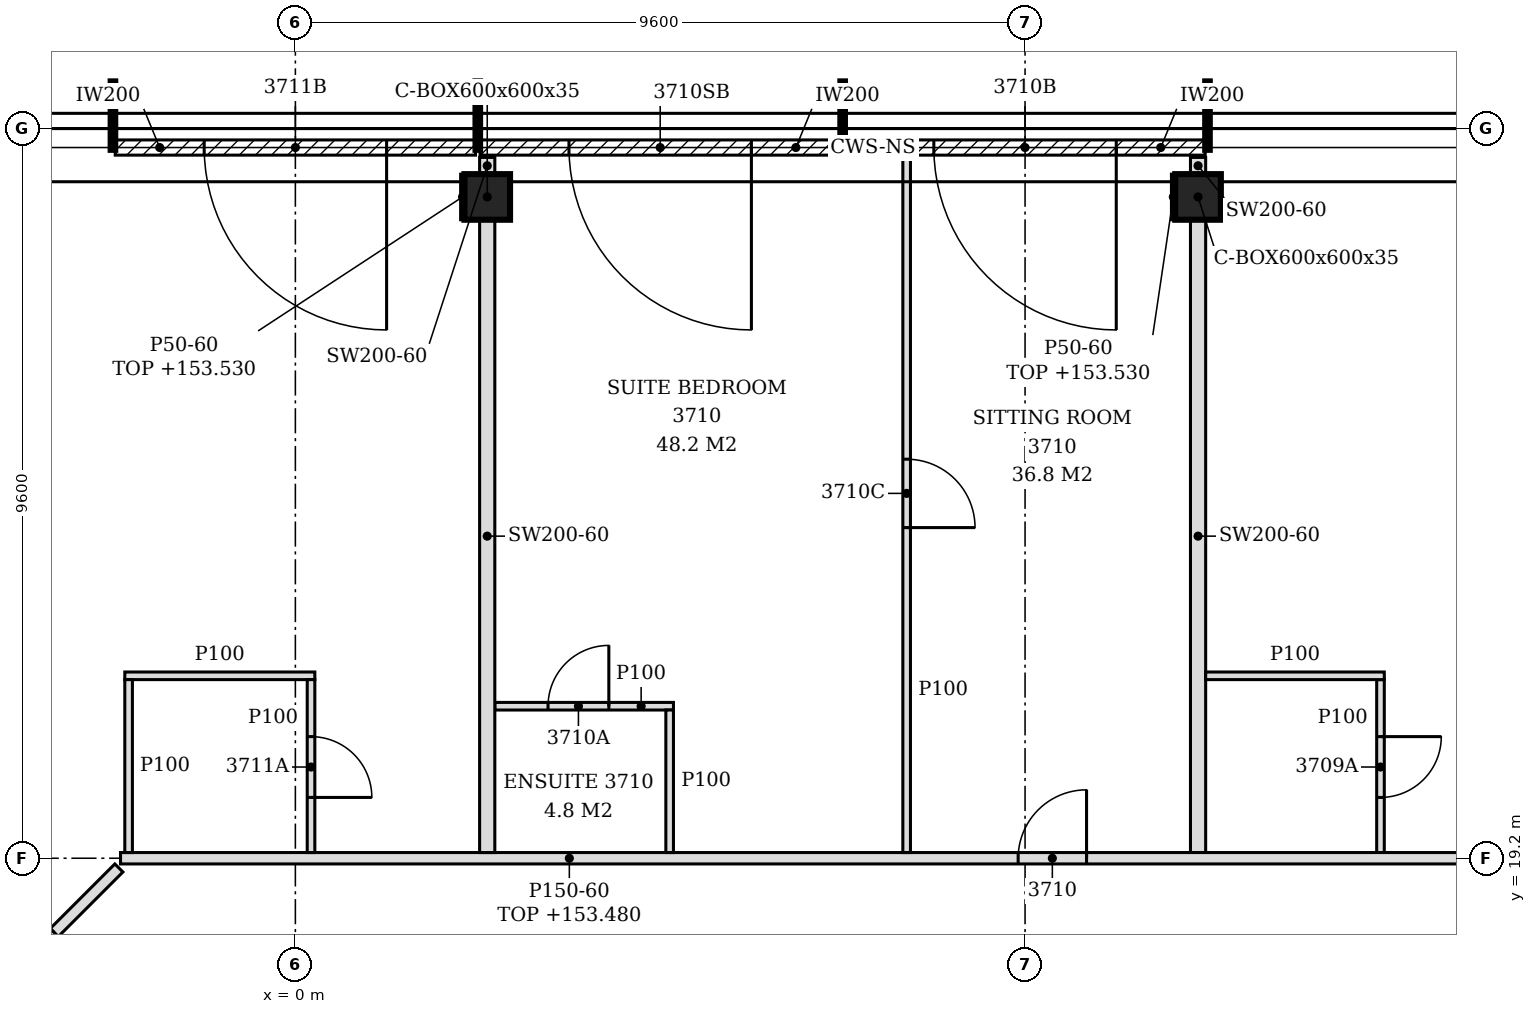
"""IFC4 building model, lengths in metres.
Left out: names, types, materials, properties, quantities, classifications, styles, units other than length and angle.
Written with IfcOpenShell. Run it as: python <this file> out.ifc"""

import sys

from ifc_helpers import new_model, si_unit, direction, frame, frame_2d, origin, origin_2d, place, context, subcontext, project, spatial, polyline, rectangle, hollow_rectangle, outline, extrude, element, fill, save


model = new_model("IFC4")
c1 = context("Model", 3, precision=1e-05, world=origin(), true_north=direction((0.0, 1.0)))
c2 = subcontext(c1, "Body", "Model", "MODEL_VIEW")
j1 = project(units=[si_unit("LENGTHUNIT", "METRE"), si_unit("PLANEANGLEUNIT", "RADIAN")], contexts=[c1])
p1 = place(None, origin())
s1 = spatial("IfcSite", under=j1, at=p1, CompositionType="ELEMENT")
p2 = place(p1, origin())
s2 = spatial("IfcBuilding", under=s1, at=p2, CompositionType="ELEMENT")
p3 = place(p2, frame((0.0, 0.0, 150.6)))
s3 = spatial("IfcBuildingStorey", under=s2, at=p3, CompositionType="ELEMENT", Elevation=150.6)
for number, where, z_axis, x_axis in (
    (1, (11.876, 27.9, -0.15), (0.0, 0.0, 1.0), (1.0, 0.0, 0.0)),
    (2, (2.524, 27.9, -0.15), (0.0, 0.0, 1.0), (1.0, 0.0, 0.0)),
):
    element("IfcColumn", number, at=place(p3, frame(where, z_axis=z_axis, x_axis=x_axis)), inside=s3, PredefinedType="COLUMN", context=c2, shape_type="SweptSolid", body=[
        extrude(hollow_rectangle(XDim=0.6, YDim=0.6, WallThickness=0.035, at=origin_2d()), origin(), (0.0, 0.0, 1.0), 3.6),
    ])
p4 = place(p3, frame((11.97, 28.55, 0.0), z_axis=(0.0, 0.0, 1.0), x_axis=(-1.0, 0.0, 0.0)))
e3 = element("IfcWall", 3, at=p4, inside=s3, PredefinedType="NOTDEFINED", context=c2, shape_type="SweptSolid", body=[
    extrude(rectangle(XDim=4.74, YDim=0.2, at=frame_2d((2.37, 0.0))), origin(), (0.0, 0.0, 1.0), 3.45),
])
p5 = place(p4, frame((1.17, 0.0, 0.0)))
e4 = element("IfcOpeningElement", 4, at=p5, cuts=e3, PredefinedType="OPENING", context=c2, shape_type="SweptSolid", body=[
    extrude(rectangle(XDim=2.4, YDim=2.4, at=frame_2d((1.2, 1.2))), frame((0.0, 0.11, 0.0), z_axis=(0.0, -1.0, 0.0), x_axis=(1.0, 0.0, 0.0)), (0.0, 0.0, 1.0), 0.22),
])
p6 = place(p3, frame((7.17, 28.55, 0.0), z_axis=(0.0, 0.0, 1.0), x_axis=(-1.0, 0.0, 0.0)))
e5 = element("IfcWall", 5, at=p6, inside=s3, PredefinedType="NOTDEFINED", context=c2, shape_type="SweptSolid", body=[
    extrude(rectangle(XDim=4.74, YDim=0.2, at=frame_2d((2.37, 0.0))), origin(), (0.0, 0.0, 1.0), 3.45),
])
p7 = place(p6, frame((1.17, 0.0, 0.0)))
e6 = element("IfcOpeningElement", 6, at=p7, cuts=e5, PredefinedType="OPENING", context=c2, shape_type="SweptSolid", body=[
    extrude(rectangle(XDim=2.4, YDim=2.4, at=frame_2d((1.2, 1.2))), frame((0.0, 0.11, 0.0), z_axis=(0.0, -1.0, 0.0), x_axis=(1.0, 0.0, 0.0)), (0.0, 0.0, 1.0), 0.22),
])
p8 = place(p3, frame((2.37, 28.55, 0.0), z_axis=(0.0, 0.0, 1.0), x_axis=(-1.0, 0.0, 0.0)))
e7 = element("IfcWall", 7, at=p8, inside=s3, PredefinedType="NOTDEFINED", context=c2, shape_type="SweptSolid", body=[
    extrude(rectangle(XDim=4.74, YDim=0.2, at=frame_2d((2.37, 0.0))), origin(), (0.0, 0.0, 1.0), 3.45),
])
p9 = place(p8, frame((1.17, 0.0, 0.0)))
e8 = element("IfcOpeningElement", 8, at=p9, cuts=e7, PredefinedType="OPENING", context=c2, shape_type="SweptSolid", body=[
    extrude(rectangle(XDim=2.4, YDim=2.4, at=frame_2d((1.2, 1.2))), frame((0.0, 0.11, 0.0), z_axis=(0.0, -1.0, 0.0), x_axis=(1.0, 0.0, 0.0)), (0.0, 0.0, 1.0), 0.22),
])
p10 = place(p3, frame((-12.075, 9.319, 0.0), z_axis=(0.0, 0.0, 1.0), x_axis=(0.707106781187, 0.707106781187, 0.0)))
e9 = element("IfcWall", 9, at=p10, inside=s3, PredefinedType="PARTITIONING", context=c2, shape_type="SweptSolid", body=[
    extrude(rectangle(XDim=13.793, YDim=0.15, at=frame_2d((6.896, 0.0))), origin(), (0.0, 0.0, 1.0), 2.73),
])
p11 = place(p10, frame((11.692, 0.0, 0.0)))
e10 = element("IfcOpeningElement", 10, at=p11, cuts=e9, PredefinedType="OPENING", context=c2, shape_type="SweptSolid", body=[
    extrude(rectangle(XDim=0.9, YDim=2.1, at=frame_2d((0.45, 1.05))), frame((0.0, 0.085, 0.0), z_axis=(0.0, -1.0, 0.0), x_axis=(1.0, 0.0, 0.0)), (0.0, 0.0, 1.0), 0.17),
])
p12 = place(p10, frame((7.376, 0.0, 0.0)))
e11 = element("IfcOpeningElement", 11, at=p12, cuts=e9, PredefinedType="OPENING", context=c2, shape_type="SweptSolid", body=[
    extrude(rectangle(XDim=0.9, YDim=2.1, at=frame_2d((0.45, 1.05))), frame((0.0, 0.085, 0.0), z_axis=(0.0, -1.0, 0.0), x_axis=(1.0, 0.0, 0.0)), (0.0, 0.0, 1.0), 0.17),
])
p13 = place(p10, frame((3.62, 0.0, 0.0)))
e12 = element("IfcOpeningElement", 12, at=p13, cuts=e9, PredefinedType="OPENING", context=c2, shape_type="SweptSolid", body=[
    extrude(rectangle(XDim=0.9, YDim=2.1, at=frame_2d((0.45, 1.05))), frame((0.0, 0.085, 0.0), z_axis=(0.0, -1.0, 0.0), x_axis=(1.0, 0.0, 0.0)), (0.0, 0.0, 1.0), 0.17),
])
p14 = place(p3, frame((-2.3, 19.2, 0.0), z_axis=(0.0, 0.0, 1.0), x_axis=(1.0, 0.0, 0.0)))
e13 = element("IfcWall", 13, at=p14, inside=s3, PredefinedType="PARTITIONING", context=c2, shape_type="SweptSolid", body=[
    extrude(outline(polyline([(0.0, 0.0), (19.0, 0.0), (19.0, 2.88), (9.65, 2.88), (9.648, 2.73), (9.35, 2.73), (9.348, 2.88), (0.0, 2.88), (0.0, 0.0)])), frame((0.0, 0.075, 0.0), z_axis=(0.0, -1.0, 0.0), x_axis=(1.0, 0.0, 0.0)), (0.0, 0.0, 1.0), 0.15),
])
p15 = place(p14, frame((11.809, 0.0, 0.0)))
e14 = element("IfcOpeningElement", 14, at=p15, cuts=e13, PredefinedType="OPENING", context=c2, shape_type="SweptSolid", body=[
    extrude(rectangle(XDim=0.9, YDim=2.1, at=frame_2d((0.45, 1.05))), frame((0.0, 0.085, 0.0), z_axis=(0.0, -1.0, 0.0), x_axis=(1.0, 0.0, 0.0)), (0.0, 0.0, 1.0), 0.17),
])
p16 = place(p3, frame((-2.194, 19.275, 0.0), z_axis=(0.0, 0.0, 1.0), x_axis=(0.0, 1.0, 0.0)))
e15 = element("IfcWall", 15, at=p16, inside=s3, PredefinedType="PARTITIONING", context=c2, shape_type="SweptSolid", body=[
    extrude(outline(polyline([(0.0, 0.0), (2.275, 0.0), (2.275, 3.45), (0.03, 3.45), (0.028, 2.88), (0.0, 2.88), (0.0, 0.0)])), frame((0.0, 0.05, 0.0), z_axis=(0.0, -1.0, 0.0), x_axis=(1.0, 0.0, 0.0)), (0.0, 0.0, 1.0), 0.1),
])
p17 = place(p3, frame((0.206, 19.275, 0.0), z_axis=(0.0, 0.0, 1.0), x_axis=(0.0, 1.0, 0.0)))
e16 = element("IfcWall", 16, at=p17, inside=s3, PredefinedType="PARTITIONING", context=c2, shape_type="SweptSolid", body=[
    extrude(outline(polyline([(0.0, 0.0), (2.275, 0.0), (2.275, 3.45), (0.03, 3.45), (0.028, 2.88), (0.0, 2.88), (0.0, 0.0)])), frame((0.0, 0.05, 0.0), z_axis=(0.0, -1.0, 0.0), x_axis=(1.0, 0.0, 0.0)), (0.0, 0.0, 1.0), 0.1),
])
p18 = place(p17, frame((0.725, 0.0, 0.0)))
e17 = element("IfcOpeningElement", 17, at=p18, cuts=e16, PredefinedType="OPENING", context=c2, shape_type="SweptSolid", body=[
    extrude(rectangle(XDim=0.8, YDim=2.1, at=frame_2d((0.4, 1.05))), frame((0.0, 0.06, 0.0), z_axis=(0.0, -1.0, 0.0), x_axis=(1.0, 0.0, 0.0)), (0.0, 0.0, 1.0), 0.12),
])
p19 = place(p3, frame((2.524, 19.275, 0.0), z_axis=(0.0, 0.0, 1.0), x_axis=(0.0, 1.0, 0.0)))
e18 = element("IfcWall", 18, at=p19, inside=s3, PredefinedType="PARTITIONING", context=c2, shape_type="SweptSolid", body=[
    extrude(outline(polyline([(0.0, 0.0), (8.325, 0.0), (8.325, 3.45), (4.83, 3.45), (4.828, 2.88), (4.62, 2.88), (4.618, 3.45), (0.03, 3.45), (0.028, 2.88), (0.0, 2.88), (0.0, 0.0)])), frame((0.0, 0.1, 0.0), z_axis=(0.0, -1.0, 0.0), x_axis=(1.0, 0.0, 0.0)), (0.0, 0.0, 1.0), 0.2),
])
p20 = place(p3, frame((4.924, 19.275, 0.0), z_axis=(0.0, 0.0, 1.0), x_axis=(0.0, 1.0, 0.0)))
e19 = element("IfcWall", 19, at=p20, inside=s3, PredefinedType="PARTITIONING", context=c2, shape_type="SweptSolid", body=[
    extrude(outline(polyline([(0.0, 0.0), (1.875, 0.0), (1.875, 3.45), (0.03, 3.45), (0.028, 2.88), (0.0, 2.88), (0.0, 0.0)])), frame((0.0, 0.05, 0.0), z_axis=(0.0, -1.0, 0.0), x_axis=(1.0, 0.0, 0.0)), (0.0, 0.0, 1.0), 0.1),
])
p21 = place(p3, frame((8.042, 19.275, 0.0), z_axis=(0.0, 0.0, 1.0), x_axis=(0.0, 1.0, 0.0)))
e20 = element("IfcWall", 20, at=p21, inside=s3, PredefinedType="PARTITIONING", context=c2, shape_type="SweptSolid", body=[
    extrude(outline(polyline([(0.0, 0.0), (9.145, 0.0), (9.145, 3.45), (8.775, 3.45), (8.773, 2.93), (8.475, 2.93), (8.473, 3.45), (4.83, 3.45), (4.828, 2.88), (4.62, 2.88), (4.618, 3.45), (0.03, 3.45), (0.028, 2.88), (0.0, 2.88), (0.0, 0.0)])), frame((0.0, 0.05, 0.0), z_axis=(0.0, -1.0, 0.0), x_axis=(1.0, 0.0, 0.0)), (0.0, 0.0, 1.0), 0.1),
])
p22 = place(p21, frame((4.275, 0.0, 0.0)))
e21 = element("IfcOpeningElement", 21, at=p22, cuts=e20, PredefinedType="OPENING", context=c2, shape_type="SweptSolid", body=[
    extrude(rectangle(XDim=0.9, YDim=2.1, at=frame_2d((0.45, 1.05))), frame((0.0, 0.06, 0.0), z_axis=(0.0, -1.0, 0.0), x_axis=(1.0, 0.0, 0.0)), (0.0, 0.0, 1.0), 0.12),
])
p23 = place(p3, frame((11.876, 19.275, 0.0), z_axis=(0.0, 0.0, 1.0), x_axis=(0.0, 1.0, 0.0)))
e22 = element("IfcWall", 22, at=p23, inside=s3, PredefinedType="PARTITIONING", context=c2, shape_type="SweptSolid", body=[
    extrude(outline(polyline([(0.0, 0.0), (8.325, 0.0), (8.325, 3.45), (4.83, 3.45), (4.828, 2.88), (4.62, 2.88), (4.618, 3.45), (0.03, 3.45), (0.028, 2.88), (0.0, 2.88), (0.0, 0.0)])), frame((0.0, 0.1, 0.0), z_axis=(0.0, -1.0, 0.0), x_axis=(1.0, 0.0, 0.0)), (0.0, 0.0, 1.0), 0.2),
])
p24 = place(p3, frame((14.276, 19.275, 0.0), z_axis=(0.0, 0.0, 1.0), x_axis=(0.0, 1.0, 0.0)))
e23 = element("IfcWall", 23, at=p24, inside=s3, PredefinedType="PARTITIONING", context=c2, shape_type="SweptSolid", body=[
    extrude(outline(polyline([(0.0, 0.0), (2.275, 0.0), (2.275, 3.45), (0.03, 3.45), (0.028, 2.88), (0.0, 2.88), (0.0, 0.0)])), frame((0.0, 0.05, 0.0), z_axis=(0.0, -1.0, 0.0), x_axis=(1.0, 0.0, 0.0)), (0.0, 0.0, 1.0), 0.1),
])
p25 = place(p24, frame((0.725, 0.0, 0.0)))
e24 = element("IfcOpeningElement", 24, at=p25, cuts=e23, PredefinedType="OPENING", context=c2, shape_type="SweptSolid", body=[
    extrude(rectangle(XDim=0.8, YDim=2.1, at=frame_2d((0.4, 1.05))), frame((0.0, 0.06, 0.0), z_axis=(0.0, -1.0, 0.0), x_axis=(1.0, 0.0, 0.0)), (0.0, 0.0, 1.0), 0.12),
])
p26 = place(p3, frame((2.624, 21.2, 0.0), z_axis=(0.0, 0.0, 1.0), x_axis=(1.0, 0.0, 0.0)))
e25 = element("IfcWall", 25, at=p26, inside=s3, PredefinedType="PARTITIONING", context=c2, shape_type="SweptSolid", body=[
    extrude(rectangle(XDim=2.35, YDim=0.1, at=frame_2d((1.175, 0.0))), origin(), (0.0, 0.0, 1.0), 3.45),
])
p27 = place(p26, frame((0.7, 0.0, 0.0)))
e26 = element("IfcOpeningElement", 26, at=p27, cuts=e25, PredefinedType="OPENING", context=c2, shape_type="SweptSolid", body=[
    extrude(rectangle(XDim=0.8, YDim=2.1, at=frame_2d((0.4, 1.05))), frame((0.0, 0.06, 0.0), z_axis=(0.0, -1.0, 0.0), x_axis=(1.0, 0.0, 0.0)), (0.0, 0.0, 1.0), 0.12),
])
p28 = place(p3, frame((-2.244, 21.6, 0.0), z_axis=(0.0, 0.0, 1.0), x_axis=(1.0, 0.0, 0.0)))
e27 = element("IfcWall", 27, at=p28, inside=s3, PredefinedType="PARTITIONING", context=c2, shape_type="SweptSolid", body=[
    extrude(rectangle(XDim=2.5, YDim=0.1, at=frame_2d((1.25, 0.0))), origin(), (0.0, 0.0, 1.0), 3.45),
])
p29 = place(p3, frame((11.976, 21.6, 0.0), z_axis=(0.0, 0.0, 1.0), x_axis=(1.0, 0.0, 0.0)))
e28 = element("IfcWall", 28, at=p29, inside=s3, PredefinedType="PARTITIONING", context=c2, shape_type="SweptSolid", body=[
    extrude(rectangle(XDim=2.35, YDim=0.1, at=frame_2d((1.175, 0.0))), origin(), (0.0, 0.0, 1.0), 3.45),
])
for number, where, z_axis, x_axis in (
    (29, (2.524, 28.2, 0.0), (0.0, 0.0, 1.0), (0.0, 1.0, 0.0)),
    (30, (11.876, 28.2, 0.0), (0.0, 0.0, 1.0), (0.0, 1.0, 0.0)),
):
    element("IfcWall", number, at=place(p3, frame(where, z_axis=z_axis, x_axis=x_axis)), inside=s3, PredefinedType="PARTITIONING", context=c2, shape_type="SweptSolid", body=[
        extrude(rectangle(XDim=0.22, YDim=0.2, at=frame_2d((0.11, 0.0))), origin(), (0.0, 0.0, 1.0), 3.45),
    ])
for number, where, z_axis, x_axis in (
    (31, (2.199, 27.6, 0.0), (0.0, 0.0, 1.0), (0.0, 1.0, 0.0)),
    (32, (11.551, 27.6, 0.0), (0.0, 0.0, 1.0), (0.0, 1.0, 0.0)),
):
    element("IfcWall", number, at=place(p3, frame(where, z_axis=z_axis, x_axis=x_axis)), inside=s3, PredefinedType="PARTITIONING", context=c2, shape_type="SweptSolid", body=[
        extrude(rectangle(XDim=0.6, YDim=0.05, at=frame_2d((0.3, 0.0))), origin(), (0.0, 0.0, 1.0), 2.93),
    ])
p30 = place(p5, origin())
e33 = element("IfcDoor", 33, at=p30, inside=s3, OperationType="SINGLE_SWING_LEFT", PredefinedType="DOOR", context=c2, shape_type="SweptSolid", body=[
    extrude(rectangle(XDim=2.4, YDim=2.4, at=frame_2d((1.2, 1.2))), frame((0.0, 0.025, 0.0), z_axis=(0.0, -1.0, 0.0), x_axis=(1.0, 0.0, 0.0)), (0.0, 0.0, 1.0), 0.05),
])
fill(e4, e33)
p31 = place(p7, origin())
e34 = element("IfcDoor", 34, at=p31, inside=s3, OperationType="SINGLE_SWING_LEFT", PredefinedType="DOOR", context=c2, shape_type="SweptSolid", body=[
    extrude(rectangle(XDim=2.4, YDim=2.4, at=frame_2d((1.2, 1.2))), frame((0.0, 0.025, 0.0), z_axis=(0.0, -1.0, 0.0), x_axis=(1.0, 0.0, 0.0)), (0.0, 0.0, 1.0), 0.05),
])
fill(e6, e34)
p32 = place(p9, origin())
e35 = element("IfcDoor", 35, at=p32, inside=s3, OperationType="SINGLE_SWING_LEFT", PredefinedType="DOOR", context=c2, shape_type="SweptSolid", body=[
    extrude(rectangle(XDim=2.4, YDim=2.4, at=frame_2d((1.2, 1.2))), frame((0.0, 0.025, 0.0), z_axis=(0.0, -1.0, 0.0), x_axis=(1.0, 0.0, 0.0)), (0.0, 0.0, 1.0), 0.05),
])
fill(e8, e35)
p33 = place(p25, frame((0.8, 0.0, 0.0), z_axis=(0.0, 0.0, 1.0), x_axis=(-1.0, 0.0, 0.0)))
e36 = element("IfcDoor", 36, at=p33, inside=s3, OperationType="SINGLE_SWING_LEFT", PredefinedType="DOOR", context=c2, shape_type="SweptSolid", body=[
    extrude(rectangle(XDim=0.8, YDim=2.1, at=frame_2d((0.4, 1.05))), frame((0.0, 0.025, 0.0), z_axis=(0.0, -1.0, 0.0), x_axis=(1.0, 0.0, 0.0)), (0.0, 0.0, 1.0), 0.05),
])
fill(e24, e36)
p34 = place(p15, origin())
e37 = element("IfcDoor", 37, at=p34, inside=s3, OperationType="SINGLE_SWING_RIGHT", PredefinedType="DOOR", context=c2, shape_type="SweptSolid", body=[
    extrude(rectangle(XDim=0.9, YDim=2.1, at=frame_2d((0.45, 1.05))), frame((0.0, 0.025, 0.0), z_axis=(0.0, -1.0, 0.0), x_axis=(1.0, 0.0, 0.0)), (0.0, 0.0, 1.0), 0.05),
])
fill(e14, e37)
p35 = place(p22, frame((0.9, 0.0, 0.0), z_axis=(0.0, 0.0, 1.0), x_axis=(-1.0, 0.0, 0.0)))
e38 = element("IfcDoor", 38, at=p35, inside=s3, OperationType="SINGLE_SWING_RIGHT", PredefinedType="DOOR", context=c2, shape_type="SweptSolid", body=[
    extrude(rectangle(XDim=0.9, YDim=2.1, at=frame_2d((0.45, 1.05))), frame((0.0, 0.025, 0.0), z_axis=(0.0, -1.0, 0.0), x_axis=(1.0, 0.0, 0.0)), (0.0, 0.0, 1.0), 0.05),
])
fill(e21, e38)
p36 = place(p27, origin())
e39 = element("IfcDoor", 39, at=p36, inside=s3, OperationType="SINGLE_SWING_RIGHT", PredefinedType="DOOR", context=c2, shape_type="SweptSolid", body=[
    extrude(rectangle(XDim=0.8, YDim=2.1, at=frame_2d((0.4, 1.05))), frame((0.0, 0.025, 0.0), z_axis=(0.0, -1.0, 0.0), x_axis=(1.0, 0.0, 0.0)), (0.0, 0.0, 1.0), 0.05),
])
fill(e26, e39)
p37 = place(p11, origin())
e40 = element("IfcDoor", 40, at=p37, inside=s3, OperationType="SINGLE_SWING_RIGHT", PredefinedType="DOOR", context=c2, shape_type="SweptSolid", body=[
    extrude(rectangle(XDim=0.9, YDim=2.1, at=frame_2d((0.45, 1.05))), frame((0.0, 0.025, 0.0), z_axis=(0.0, -1.0, 0.0), x_axis=(1.0, 0.0, 0.0)), (0.0, 0.0, 1.0), 0.05),
])
fill(e10, e40)
p38 = place(p18, frame((0.8, 0.0, 0.0), z_axis=(0.0, 0.0, 1.0), x_axis=(-1.0, 0.0, 0.0)))
e41 = element("IfcDoor", 41, at=p38, inside=s3, OperationType="SINGLE_SWING_RIGHT", PredefinedType="DOOR", context=c2, shape_type="SweptSolid", body=[
    extrude(rectangle(XDim=0.8, YDim=2.1, at=frame_2d((0.4, 1.05))), frame((0.0, 0.025, 0.0), z_axis=(0.0, -1.0, 0.0), x_axis=(1.0, 0.0, 0.0)), (0.0, 0.0, 1.0), 0.05),
])
fill(e17, e41)
save(model, sys.argv[1])
